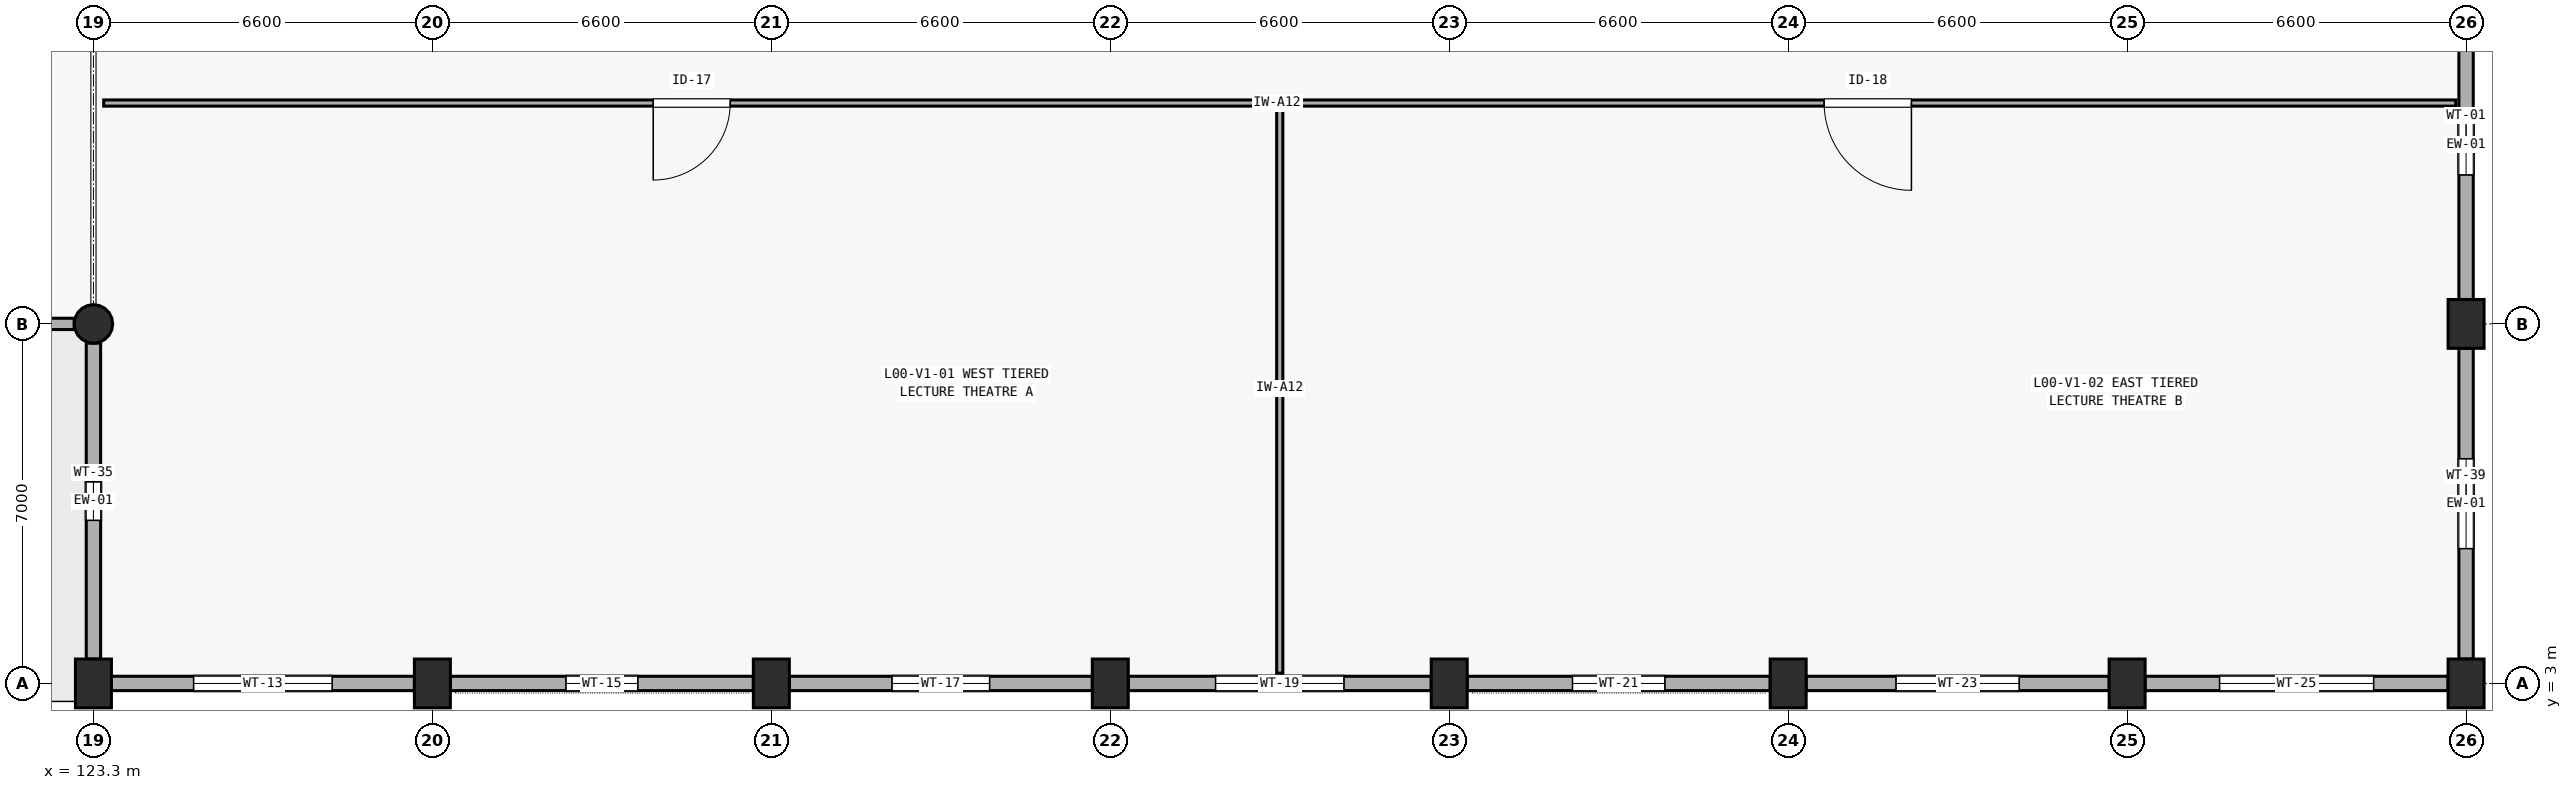
"""IFC4 building model, lengths in metres.
Left out: names, types, materials, properties, quantities, classifications, styles, units other than length and angle.
Written with IfcOpenShell. Run it as: python <this file> out.ifc"""

import sys

from ifc_helpers import new_model, si_unit, direction, frame, frame_2d, origin, origin_2d, place, context, subcontext, project, spatial, rectangle, circle, extrude, element, fill, save


model = new_model("IFC4")
c1 = context("Model", 3, precision=1e-05, world=origin(), true_north=direction((0.0, 1.0)))
c2 = subcontext(c1, "Body", "Model", "MODEL_VIEW")
j1 = project(units=[si_unit("LENGTHUNIT", "METRE"), si_unit("PLANEANGLEUNIT", "RADIAN")], contexts=[c1])
p1 = place(None, origin())
s1 = spatial("IfcSite", under=j1, at=p1, CompositionType="ELEMENT")
p2 = place(p1, origin())
s2 = spatial("IfcBuilding", under=s1, at=p2, CompositionType="ELEMENT")
p3 = place(p2, origin())
s3 = spatial("IfcBuildingStorey", under=s2, at=p3, CompositionType="ELEMENT", Elevation=0.0)
p4 = place(p3, frame((123.3, 3.0, 0.0), z_axis=(0.0, 0.0, 1.0), x_axis=(1.0, 0.0, 0.0)))
e1 = element("IfcColumn", 1, at=p4, inside=s3, PredefinedType="COLUMN", context=c2, shape_type="SweptSolid", body=[
    extrude(rectangle(XDim=0.7, YDim=0.95, at=origin_2d()), origin(), (0.0, 0.0, 1.0), 4.2),
])
p5 = place(p3, frame((123.3, 10.0, 0.0), z_axis=(0.0, 0.0, 1.0), x_axis=(1.0, 0.0, 0.0)))
e2 = element("IfcColumn", 2, at=p5, inside=s3, PredefinedType="COLUMN", context=c2, shape_type="SweptSolid", body=[
    extrude(circle(Radius=0.375, at=origin_2d()), origin(), (0.0, 0.0, 1.0), 4.2),
])
for number, where, z_axis, x_axis in (
    (3, (129.9, 3.0, 0.0), (0.0, 0.0, 1.0), (1.0, 0.0, 0.0)),
    (4, (136.5, 3.0, 0.0), (0.0, 0.0, 1.0), (1.0, 0.0, 0.0)),
    (5, (143.1, 3.0, 0.0), (0.0, 0.0, 1.0), (1.0, 0.0, 0.0)),
    (6, (149.7, 3.0, 0.0), (0.0, 0.0, 1.0), (1.0, 0.0, 0.0)),
    (7, (156.3, 3.0, 0.0), (0.0, 0.0, 1.0), (1.0, 0.0, 0.0)),
    (8, (162.9, 3.0, 0.0), (0.0, 0.0, 1.0), (1.0, 0.0, 0.0)),
    (9, (169.5, 3.0, 0.0), (0.0, 0.0, 1.0), (1.0, 0.0, 0.0)),
    (10, (169.5, 10.0, 0.0), (0.0, 0.0, 1.0), (1.0, 0.0, 0.0)),
):
    element("IfcColumn", number, at=place(p3, frame(where, z_axis=z_axis, x_axis=x_axis)), inside=s3, PredefinedType="COLUMN", context=c2, shape_type="SweptSolid", body=[
        extrude(rectangle(XDim=0.7, YDim=0.95, at=origin_2d()), origin(), (0.0, 0.0, 1.0), 4.2),
    ])
p6 = place(p3, frame((123.65, 3.0, 0.0), z_axis=(0.0, 0.0, 1.0), x_axis=(1.0, 0.0, 0.0)))
e11 = element("IfcWall", 11, at=p6, inside=s3, PredefinedType="SOLIDWALL", context=c2, shape_type="SweptSolid", body=[
    extrude(rectangle(XDim=5.9, YDim=0.28, at=frame_2d((2.95, 0.0))), origin(), (0.0, 0.0, 1.0), 3.385),
])
p7 = place(p6, frame((1.6, 0.0, 0.85)))
e12 = element("IfcOpeningElement", 12, at=p7, cuts=e11, PredefinedType="OPENING", context=c2, shape_type="SweptSolid", body=[
    extrude(rectangle(XDim=2.7, YDim=1.5, at=frame_2d((1.35, 0.75))), frame((0.0, 0.15, 0.0), z_axis=(0.0, -1.0, 0.0), x_axis=(1.0, 0.0, 0.0)), (0.0, 0.0, 1.0), 0.3),
])
p8 = place(p3, frame((130.25, 3.0, 0.0), z_axis=(0.0, 0.0, 1.0), x_axis=(1.0, 0.0, 0.0)))
e13 = element("IfcWall", 13, at=p8, inside=s3, PredefinedType="SOLIDWALL", context=c2, shape_type="SweptSolid", body=[
    extrude(rectangle(XDim=5.9, YDim=0.28, at=frame_2d((2.95, 0.0))), origin(), (0.0, 0.0, 1.0), 3.345),
])
p9 = place(p8, frame((2.25, 0.0, 0.85)))
e14 = element("IfcOpeningElement", 14, at=p9, cuts=e13, PredefinedType="OPENING", context=c2, shape_type="SweptSolid", body=[
    extrude(rectangle(XDim=1.4, YDim=1.25, at=frame_2d((0.7, 0.625))), frame((0.0, 0.15, 0.0), z_axis=(0.0, -1.0, 0.0), x_axis=(1.0, 0.0, 0.0)), (0.0, 0.0, 1.0), 0.3),
])
p10 = place(p3, frame((136.85, 3.0, 0.0), z_axis=(0.0, 0.0, 1.0), x_axis=(1.0, 0.0, 0.0)))
e15 = element("IfcWall", 15, at=p10, inside=s3, PredefinedType="SOLIDWALL", context=c2, shape_type="SweptSolid", body=[
    extrude(rectangle(XDim=5.9, YDim=0.28, at=frame_2d((2.95, 0.0))), origin(), (0.0, 0.0, 1.0), 3.345),
])
p11 = place(p10, frame((2.0, 0.0, 0.85)))
e16 = element("IfcOpeningElement", 16, at=p11, cuts=e15, PredefinedType="OPENING", context=c2, shape_type="SweptSolid", body=[
    extrude(rectangle(XDim=1.9, YDim=1.25, at=frame_2d((0.95, 0.625))), frame((0.0, 0.15, 0.0), z_axis=(0.0, -1.0, 0.0), x_axis=(1.0, 0.0, 0.0)), (0.0, 0.0, 1.0), 0.3),
])
p12 = place(p3, frame((143.45, 3.0, 0.0), z_axis=(0.0, 0.0, 1.0), x_axis=(1.0, 0.0, 0.0)))
e17 = element("IfcWall", 17, at=p12, inside=s3, PredefinedType="SOLIDWALL", context=c2, shape_type="SweptSolid", body=[
    extrude(rectangle(XDim=5.9, YDim=0.28, at=frame_2d((2.95, 0.0))), origin(), (0.0, 0.0, 1.0), 3.135),
])
p13 = place(p12, frame((1.7, 0.0, 0.85)))
e18 = element("IfcOpeningElement", 18, at=p13, cuts=e17, PredefinedType="OPENING", context=c2, shape_type="SweptSolid", body=[
    extrude(rectangle(XDim=2.5, YDim=1.25, at=frame_2d((1.25, 0.625))), frame((0.0, 0.15, 0.0), z_axis=(0.0, -1.0, 0.0), x_axis=(1.0, 0.0, 0.0)), (0.0, 0.0, 1.0), 0.3),
])
p14 = place(p3, frame((150.05, 3.0, 0.0), z_axis=(0.0, 0.0, 1.0), x_axis=(1.0, 0.0, 0.0)))
e19 = element("IfcWall", 19, at=p14, inside=s3, PredefinedType="SOLIDWALL", context=c2, shape_type="SweptSolid", body=[
    extrude(rectangle(XDim=5.9, YDim=0.28, at=frame_2d((2.95, 0.0))), origin(), (0.0, 0.0, 1.0), 3.235),
])
p15 = place(p14, frame((2.05, 0.0, 0.85)))
e20 = element("IfcOpeningElement", 20, at=p15, cuts=e19, PredefinedType="OPENING", context=c2, shape_type="SweptSolid", body=[
    extrude(rectangle(XDim=1.8, YDim=1.6, at=frame_2d((0.9, 0.8))), frame((0.0, 0.15, 0.0), z_axis=(0.0, -1.0, 0.0), x_axis=(1.0, 0.0, 0.0)), (0.0, 0.0, 1.0), 0.3),
])
p16 = place(p3, frame((156.65, 3.0, 0.0), z_axis=(0.0, 0.0, 1.0), x_axis=(1.0, 0.0, 0.0)))
e21 = element("IfcWall", 21, at=p16, inside=s3, PredefinedType="SOLIDWALL", context=c2, shape_type="SweptSolid", body=[
    extrude(rectangle(XDim=5.9, YDim=0.28, at=frame_2d((2.95, 0.0))), origin(), (0.0, 0.0, 1.0), 3.235),
])
p17 = place(p16, frame((1.75, 0.0, 0.85)))
e22 = element("IfcOpeningElement", 22, at=p17, cuts=e21, PredefinedType="OPENING", context=c2, shape_type="SweptSolid", body=[
    extrude(rectangle(XDim=2.4, YDim=1.6, at=frame_2d((1.2, 0.8))), frame((0.0, 0.15, 0.0), z_axis=(0.0, -1.0, 0.0), x_axis=(1.0, 0.0, 0.0)), (0.0, 0.0, 1.0), 0.3),
])
p18 = place(p3, frame((163.25, 3.0, 0.0), z_axis=(0.0, 0.0, 1.0), x_axis=(1.0, 0.0, 0.0)))
e23 = element("IfcWall", 23, at=p18, inside=s3, PredefinedType="SOLIDWALL", context=c2, shape_type="SweptSolid", body=[
    extrude(rectangle(XDim=5.9, YDim=0.28, at=frame_2d((2.95, 0.0))), origin(), (0.0, 0.0, 1.0), 3.285),
])
p19 = place(p18, frame((1.45, 0.0, 0.85)))
e24 = element("IfcOpeningElement", 24, at=p19, cuts=e23, PredefinedType="OPENING", context=c2, shape_type="SweptSolid", body=[
    extrude(rectangle(XDim=3.0, YDim=1.6, at=frame_2d((1.5, 0.8))), frame((0.0, 0.15, 0.0), z_axis=(0.0, -1.0, 0.0), x_axis=(1.0, 0.0, 0.0)), (0.0, 0.0, 1.0), 0.3),
])
p20 = place(p3, frame((117.075, 10.0, 0.0), z_axis=(0.0, 0.0, 1.0), x_axis=(1.0, 0.0, 0.0)))
e25 = element("IfcWall", 25, at=p20, inside=s3, PredefinedType="SOLIDWALL", context=c2, shape_type="SweptSolid", body=[
    extrude(rectangle(XDim=5.85, YDim=0.22, at=frame_2d((2.925, 0.0))), origin(), (0.0, 0.0, 1.0), 3.385),
])
p21 = place(p20, frame((1.975, 0.0, 0.0)))
e26 = element("IfcOpeningElement", 26, at=p21, cuts=e25, PredefinedType="OPENING", context=c2, shape_type="SweptSolid", body=[
    extrude(rectangle(XDim=1.9, YDim=2.2, at=frame_2d((0.95, 1.1))), frame((0.0, 0.12, 0.0), z_axis=(0.0, -1.0, 0.0), x_axis=(1.0, 0.0, 0.0)), (0.0, 0.0, 1.0), 0.24),
])
p22 = place(p3, frame((123.3, 3.475, 0.0), z_axis=(0.0, 0.0, 1.0), x_axis=(0.0, 1.0, 0.0)))
e27 = element("IfcWall", 27, at=p22, inside=s3, PredefinedType="SOLIDWALL", context=c2, shape_type="SweptSolid", body=[
    extrude(rectangle(XDim=6.15, YDim=0.28, at=frame_2d((3.075, 0.0))), origin(), (0.0, 0.0, 1.0), 3.505),
])
p23 = place(p22, frame((2.7, 0.0, 0.85)))
e28 = element("IfcOpeningElement", 28, at=p23, cuts=e27, PredefinedType="OPENING", context=c2, shape_type="SweptSolid", body=[
    extrude(rectangle(XDim=0.75, YDim=1.55, at=frame_2d((0.375, 0.775))), frame((0.0, 0.15, 0.0), z_axis=(0.0, -1.0, 0.0), x_axis=(1.0, 0.0, 0.0)), (0.0, 0.0, 1.0), 0.3),
])
p24 = place(p3, frame((169.5, 3.475, 0.0), z_axis=(0.0, 0.0, 1.0), x_axis=(0.0, 1.0, 0.0)))
e29 = element("IfcWall", 29, at=p24, inside=s3, PredefinedType="SOLIDWALL", context=c2, shape_type="SweptSolid", body=[
    extrude(rectangle(XDim=6.05, YDim=0.28, at=frame_2d((3.025, 0.0))), origin(), (0.0, 0.0, 1.0), 3.565),
])
p25 = place(p24, frame((2.15, 0.0, 0.85)))
e30 = element("IfcOpeningElement", 30, at=p25, cuts=e29, PredefinedType="OPENING", context=c2, shape_type="SweptSolid", body=[
    extrude(rectangle(XDim=1.75, YDim=1.55, at=frame_2d((0.875, 0.775))), frame((0.0, 0.15, 0.0), z_axis=(0.0, -1.0, 0.0), x_axis=(1.0, 0.0, 0.0)), (0.0, 0.0, 1.0), 0.3),
])
p26 = place(p3, frame((169.5, 10.475, 0.0), z_axis=(0.0, 0.0, 1.0), x_axis=(0.0, 1.0, 0.0)))
e31 = element("IfcWall", 31, at=p26, inside=s3, PredefinedType="SOLIDWALL", context=c2, shape_type="SweptSolid", body=[
    extrude(rectangle(XDim=6.05, YDim=0.28, at=frame_2d((3.025, 0.0))), origin(), (0.0, 0.0, 1.0), 3.565),
])
p27 = place(p26, frame((2.425, 0.0, 0.85)))
e32 = element("IfcOpeningElement", 32, at=p27, cuts=e31, PredefinedType="OPENING", context=c2, shape_type="SweptSolid", body=[
    extrude(rectangle(XDim=1.2, YDim=1.35, at=frame_2d((0.6, 0.675))), frame((0.0, 0.15, 0.0), z_axis=(0.0, -1.0, 0.0), x_axis=(1.0, 0.0, 0.0)), (0.0, 0.0, 1.0), 0.3),
])
p28 = place(p3, frame((123.5, 14.3, 0.0), z_axis=(0.0, 0.0, 1.0), x_axis=(1.0, 0.0, 0.0)))
e33 = element("IfcWall", 33, at=p28, inside=s3, PredefinedType="PARTITIONING", context=c2, shape_type="SweptSolid", body=[
    extrude(rectangle(XDim=22.9, YDim=0.12, at=frame_2d((11.45, 0.0))), origin(), (0.0, 0.0, 1.0), 3.9),
])
p29 = place(p28, frame((10.7, 0.0, 0.0)))
e34 = element("IfcOpeningElement", 34, at=p29, cuts=e33, PredefinedType="OPENING", context=c2, shape_type="SweptSolid", body=[
    extrude(rectangle(XDim=1.5, YDim=2.15, at=frame_2d((0.75, 1.075))), frame((0.0, 0.07, 0.0), z_axis=(0.0, -1.0, 0.0), x_axis=(1.0, 0.0, 0.0)), (0.0, 0.0, 1.0), 0.14),
])
p30 = place(p3, frame((146.4, 3.2, 0.0), z_axis=(0.0, 0.0, 1.0), x_axis=(0.0, 1.0, 0.0)))
e35 = element("IfcWall", 35, at=p30, inside=s3, PredefinedType="PARTITIONING", context=c2, shape_type="SweptSolid", body=[
    extrude(rectangle(XDim=11.1, YDim=0.12, at=frame_2d((5.55, 0.0))), origin(), (0.0, 0.0, 1.0), 3.9),
])
p31 = place(p3, frame((146.4, 14.3, 0.0), z_axis=(0.0, 0.0, 1.0), x_axis=(1.0, 0.0, 0.0)))
e36 = element("IfcWall", 36, at=p31, inside=s3, PredefinedType="PARTITIONING", context=c2, shape_type="SweptSolid", body=[
    extrude(rectangle(XDim=22.9, YDim=0.12, at=frame_2d((11.45, 0.0))), origin(), (0.0, 0.0, 1.0), 3.9),
])
p32 = place(p31, frame((10.6, 0.0, 0.0)))
e37 = element("IfcOpeningElement", 37, at=p32, cuts=e36, PredefinedType="OPENING", context=c2, shape_type="SweptSolid", body=[
    extrude(rectangle(XDim=1.7, YDim=2.2, at=frame_2d((0.85, 1.1))), frame((0.0, 0.07, 0.0), z_axis=(0.0, -1.0, 0.0), x_axis=(1.0, 0.0, 0.0)), (0.0, 0.0, 1.0), 0.14),
])
p33 = place(p7, origin())
e38 = element("IfcWindow", 38, at=p33, inside=s3, PartitioningType="SINGLE_PANEL", PredefinedType="WINDOW", context=c2, shape_type="SweptSolid", body=[
    extrude(rectangle(XDim=2.7, YDim=1.5, at=frame_2d((1.35, 0.75))), frame((0.0, 0.03, 0.0), z_axis=(0.0, -1.0, 0.0), x_axis=(1.0, 0.0, 0.0)), (0.0, 0.0, 1.0), 0.06),
])
fill(e12, e38)
p34 = place(p9, origin())
e39 = element("IfcWindow", 39, at=p34, inside=s3, PartitioningType="SINGLE_PANEL", PredefinedType="WINDOW", context=c2, shape_type="SweptSolid", body=[
    extrude(rectangle(XDim=1.4, YDim=1.25, at=frame_2d((0.7, 0.625))), frame((0.0, 0.03, 0.0), z_axis=(0.0, -1.0, 0.0), x_axis=(1.0, 0.0, 0.0)), (0.0, 0.0, 1.0), 0.06),
])
fill(e14, e39)
p35 = place(p11, origin())
e40 = element("IfcWindow", 40, at=p35, inside=s3, PartitioningType="SINGLE_PANEL", PredefinedType="WINDOW", context=c2, shape_type="SweptSolid", body=[
    extrude(rectangle(XDim=1.9, YDim=1.25, at=frame_2d((0.95, 0.625))), frame((0.0, 0.03, 0.0), z_axis=(0.0, -1.0, 0.0), x_axis=(1.0, 0.0, 0.0)), (0.0, 0.0, 1.0), 0.06),
])
fill(e16, e40)
p36 = place(p13, origin())
e41 = element("IfcWindow", 41, at=p36, inside=s3, PartitioningType="SINGLE_PANEL", PredefinedType="WINDOW", context=c2, shape_type="SweptSolid", body=[
    extrude(rectangle(XDim=2.5, YDim=1.25, at=frame_2d((1.25, 0.625))), frame((0.0, 0.03, 0.0), z_axis=(0.0, -1.0, 0.0), x_axis=(1.0, 0.0, 0.0)), (0.0, 0.0, 1.0), 0.06),
])
fill(e18, e41)
p37 = place(p15, origin())
e42 = element("IfcWindow", 42, at=p37, inside=s3, PartitioningType="SINGLE_PANEL", PredefinedType="WINDOW", context=c2, shape_type="SweptSolid", body=[
    extrude(rectangle(XDim=1.8, YDim=1.6, at=frame_2d((0.9, 0.8))), frame((0.0, 0.03, 0.0), z_axis=(0.0, -1.0, 0.0), x_axis=(1.0, 0.0, 0.0)), (0.0, 0.0, 1.0), 0.06),
])
fill(e20, e42)
p38 = place(p17, origin())
e43 = element("IfcWindow", 43, at=p38, inside=s3, PartitioningType="SINGLE_PANEL", PredefinedType="WINDOW", context=c2, shape_type="SweptSolid", body=[
    extrude(rectangle(XDim=2.4, YDim=1.6, at=frame_2d((1.2, 0.8))), frame((0.0, 0.03, 0.0), z_axis=(0.0, -1.0, 0.0), x_axis=(1.0, 0.0, 0.0)), (0.0, 0.0, 1.0), 0.06),
])
fill(e22, e43)
p39 = place(p19, origin())
e44 = element("IfcWindow", 44, at=p39, inside=s3, PartitioningType="SINGLE_PANEL", PredefinedType="WINDOW", context=c2, shape_type="SweptSolid", body=[
    extrude(rectangle(XDim=3.0, YDim=1.6, at=frame_2d((1.5, 0.8))), frame((0.0, 0.03, 0.0), z_axis=(0.0, -1.0, 0.0), x_axis=(1.0, 0.0, 0.0)), (0.0, 0.0, 1.0), 0.06),
])
fill(e24, e44)
p40 = place(p23, origin())
e45 = element("IfcWindow", 45, at=p40, inside=s3, PartitioningType="SINGLE_PANEL", PredefinedType="WINDOW", context=c2, shape_type="SweptSolid", body=[
    extrude(rectangle(XDim=0.75, YDim=1.55, at=frame_2d((0.375, 0.775))), frame((0.0, 0.03, 0.0), z_axis=(0.0, -1.0, 0.0), x_axis=(1.0, 0.0, 0.0)), (0.0, 0.0, 1.0), 0.06),
])
fill(e28, e45)
p41 = place(p25, origin())
e46 = element("IfcWindow", 46, at=p41, inside=s3, PartitioningType="SINGLE_PANEL", PredefinedType="WINDOW", context=c2, shape_type="SweptSolid", body=[
    extrude(rectangle(XDim=1.75, YDim=1.55, at=frame_2d((0.875, 0.775))), frame((0.0, 0.03, 0.0), z_axis=(0.0, -1.0, 0.0), x_axis=(1.0, 0.0, 0.0)), (0.0, 0.0, 1.0), 0.06),
])
fill(e30, e46)
p42 = place(p27, origin())
e47 = element("IfcWindow", 47, at=p42, inside=s3, PartitioningType="SINGLE_PANEL", PredefinedType="WINDOW", context=c2, shape_type="SweptSolid", body=[
    extrude(rectangle(XDim=1.2, YDim=1.35, at=frame_2d((0.6, 0.675))), frame((0.0, 0.03, 0.0), z_axis=(0.0, -1.0, 0.0), x_axis=(1.0, 0.0, 0.0)), (0.0, 0.0, 1.0), 0.06),
])
fill(e32, e47)
p43 = place(p29, frame((1.5, 0.0, 0.0), z_axis=(0.0, 0.0, 1.0), x_axis=(-1.0, 0.0, 0.0)))
e48 = element("IfcDoor", 48, at=p43, inside=s3, OperationType="SINGLE_SWING_RIGHT", PredefinedType="DOOR", context=c2, shape_type="SweptSolid", body=[
    extrude(rectangle(XDim=1.5, YDim=2.15, at=frame_2d((0.75, 1.075))), frame((0.0, 0.025, 0.0), z_axis=(0.0, -1.0, 0.0), x_axis=(1.0, 0.0, 0.0)), (0.0, 0.0, 1.0), 0.05),
])
fill(e34, e48)
p44 = place(p32, frame((1.7, 0.0, 0.0), z_axis=(0.0, 0.0, 1.0), x_axis=(-1.0, 0.0, 0.0)))
e49 = element("IfcDoor", 49, at=p44, inside=s3, OperationType="SINGLE_SWING_LEFT", PredefinedType="DOOR", context=c2, shape_type="SweptSolid", body=[
    extrude(rectangle(XDim=1.7, YDim=2.2, at=frame_2d((0.85, 1.1))), frame((0.0, 0.025, 0.0), z_axis=(0.0, -1.0, 0.0), x_axis=(1.0, 0.0, 0.0)), (0.0, 0.0, 1.0), 0.05),
])
fill(e37, e49)
save(model, sys.argv[1])
